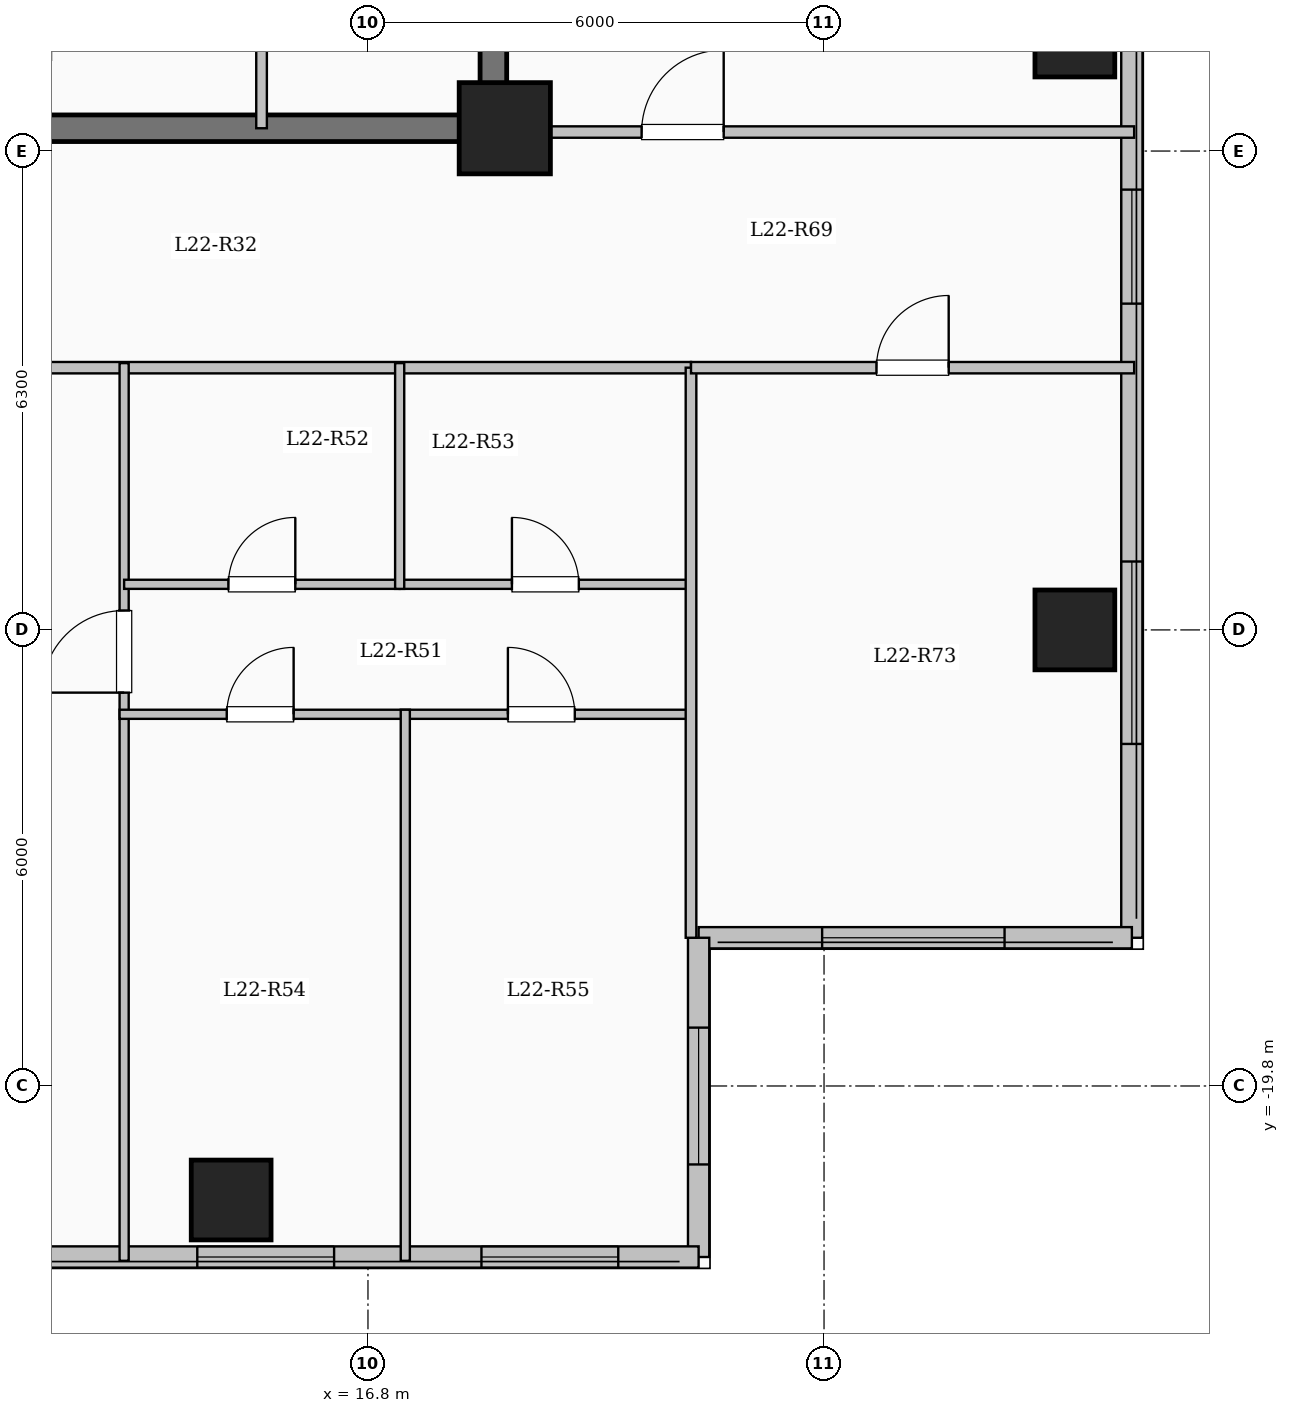
"""IFC4 building model, lengths in metres.
Left out: names, types, materials, properties, quantities, classifications, styles, units other than length and angle.
Written with IfcOpenShell. Run it as: python <this file> out.ifc"""

import sys

from ifc_helpers import new_model, si_unit, direction, frame, frame_2d, origin, origin_2d, place, context, subcontext, project, spatial, rectangle, extrude, element, fill, save


model = new_model("IFC4")
c1 = context("Model", 3, precision=1e-05, world=origin(), true_north=direction((0.0, 1.0)))
c2 = subcontext(c1, "Body", "Model", "MODEL_VIEW")
j1 = project(units=[si_unit("LENGTHUNIT", "METRE"), si_unit("PLANEANGLEUNIT", "RADIAN")], contexts=[c1])
p1 = place(None, origin())
s1 = spatial("IfcSite", under=j1, at=p1, CompositionType="ELEMENT")
p2 = place(p1, origin())
s2 = spatial("IfcBuilding", under=s1, at=p2, CompositionType="ELEMENT")
p3 = place(p2, frame((0.0, 0.0, 85.0)))
s3 = spatial("IfcBuildingStorey", under=s2, at=p3, CompositionType="ELEMENT", Elevation=85.0)
p4 = place(p3, frame((18.6, -7.2, 0.0), z_axis=(0.0, 0.0, 1.0), x_axis=(1.0, 0.0, 0.0)))
e1 = element("IfcColumn", 1, at=p4, inside=s3, PredefinedType="COLUMN", context=c2, shape_type="SweptSolid", body=[
    extrude(rectangle(XDim=1.2, YDim=1.2, at=origin_2d()), origin(), (0.0, 0.0, 1.0), 3.35),
])
for number, where, z_axis, x_axis in (
    (2, (15.0, -21.3, 0.0), (0.0, 0.0, 1.0), (1.0, 0.0, 0.0)),
    (3, (26.1, -13.8, 0.0), (0.0, 0.0, 1.0), (1.0, 0.0, 0.0)),
    (4, (26.1, -6.0, 0.0), (0.0, 0.0, 1.0), (1.0, 0.0, 0.0)),
):
    element("IfcColumn", number, at=place(p3, frame(where, z_axis=z_axis, x_axis=x_axis)), inside=s3, PredefinedType="COLUMN", context=c2, shape_type="SweptSolid", body=[
        extrude(rectangle(XDim=1.05, YDim=1.05, at=origin_2d()), origin(), (0.0, 0.0, 1.0), 3.35),
    ])
p5 = place(p3, frame((26.85, 17.85, 0.0), z_axis=(0.0, 0.0, 1.0), x_axis=(0.0, -1.0, 0.0)))
e5 = element("IfcWall", 5, at=p5, inside=s3, PredefinedType="SOLIDWALL", context=c2, shape_type="SweptSolid", body=[
    extrude(rectangle(XDim=35.7, YDim=0.28, at=frame_2d((17.85, 0.0))), origin(), (0.0, 0.0, 1.0), 3.1),
])
p6 = place(p5, frame((1.675, 0.0, 0.9)))
e6 = element("IfcOpeningElement", 6, at=p6, cuts=e5, PredefinedType="OPENING", context=c2, shape_type="SweptSolid", body=[
    extrude(rectangle(XDim=2.0, YDim=1.7, at=frame_2d((1.0, 0.85))), frame((0.0, 0.15, 0.0), z_axis=(0.0, -1.0, 0.0), x_axis=(1.0, 0.0, 0.0)), (0.0, 0.0, 1.0), 0.3),
])
p7 = place(p5, frame((5.725, 0.0, 0.95)))
e7 = element("IfcOpeningElement", 7, at=p7, cuts=e5, PredefinedType="OPENING", context=c2, shape_type="SweptSolid", body=[
    extrude(rectangle(XDim=1.0, YDim=1.5, at=frame_2d((0.5, 0.75))), frame((0.0, 0.15, 0.0), z_axis=(0.0, -1.0, 0.0), x_axis=(1.0, 0.0, 0.0)), (0.0, 0.0, 1.0), 0.3),
])
p8 = place(p5, frame((15.1, 0.0, 0.9)))
e8 = element("IfcOpeningElement", 8, at=p8, cuts=e5, PredefinedType="OPENING", context=c2, shape_type="SweptSolid", body=[
    extrude(rectangle(XDim=2.0, YDim=1.7, at=frame_2d((1.0, 0.85))), frame((0.0, 0.15, 0.0), z_axis=(0.0, -1.0, 0.0), x_axis=(1.0, 0.0, 0.0)), (0.0, 0.0, 1.0), 0.3),
])
p9 = place(p5, frame((25.857, 0.0, 0.9)))
e9 = element("IfcOpeningElement", 9, at=p9, cuts=e5, PredefinedType="OPENING", context=c2, shape_type="SweptSolid", body=[
    extrude(rectangle(XDim=1.5, YDim=1.65, at=frame_2d((0.75, 0.825))), frame((0.0, 0.15, 0.0), z_axis=(0.0, -1.0, 0.0), x_axis=(1.0, 0.0, 0.0)), (0.0, 0.0, 1.0), 0.3),
])
p10 = place(p5, frame((30.75, 0.0, 0.9)))
e10 = element("IfcOpeningElement", 10, at=p10, cuts=e5, PredefinedType="OPENING", context=c2, shape_type="SweptSolid", body=[
    extrude(rectangle(XDim=2.4, YDim=1.8, at=frame_2d((1.2, 0.9))), frame((0.0, 0.15, 0.0), z_axis=(0.0, -1.0, 0.0), x_axis=(1.0, 0.0, 0.0)), (0.0, 0.0, 1.0), 0.3),
])
p11 = place(p3, frame((26.85, -17.85, 0.0), z_axis=(0.0, 0.0, 1.0), x_axis=(-1.0, 0.0, 0.0)))
e11 = element("IfcWall", 11, at=p11, inside=s3, PredefinedType="SOLIDWALL", context=c2, shape_type="SweptSolid", body=[
    extrude(rectangle(XDim=5.7, YDim=0.28, at=frame_2d((2.85, 0.0))), origin(), (0.0, 0.0, 1.0), 3.1),
])
p12 = place(p11, frame((1.675, 0.0, 0.9)))
e12 = element("IfcOpeningElement", 12, at=p12, cuts=e11, PredefinedType="OPENING", context=c2, shape_type="SweptSolid", body=[
    extrude(rectangle(XDim=2.4, YDim=1.8, at=frame_2d((1.2, 0.9))), frame((0.0, 0.15, 0.0), z_axis=(0.0, -1.0, 0.0), x_axis=(1.0, 0.0, 0.0)), (0.0, 0.0, 1.0), 0.3),
])
p13 = place(p3, frame((21.15, -17.85, 0.0), z_axis=(0.0, 0.0, 1.0), x_axis=(0.0, -1.0, 0.0)))
e13 = element("IfcWall", 13, at=p13, inside=s3, PredefinedType="SOLIDWALL", context=c2, shape_type="SweptSolid", body=[
    extrude(rectangle(XDim=4.2, YDim=0.28, at=frame_2d((2.1, 0.0))), origin(), (0.0, 0.0, 1.0), 3.1),
])
p14 = place(p13, frame((1.182, 0.0, 0.9)))
e14 = element("IfcOpeningElement", 14, at=p14, cuts=e13, PredefinedType="OPENING", context=c2, shape_type="SweptSolid", body=[
    extrude(rectangle(XDim=1.8, YDim=1.65, at=frame_2d((0.9, 0.825))), frame((0.0, 0.15, 0.0), z_axis=(0.0, -1.0, 0.0), x_axis=(1.0, 0.0, 0.0)), (0.0, 0.0, 1.0), 0.3),
])
p15 = place(p3, frame((21.15, -22.05, 0.0), z_axis=(0.0, 0.0, 1.0), x_axis=(-1.0, 0.0, 0.0)))
e15 = element("IfcWall", 15, at=p15, inside=s3, PredefinedType="SOLIDWALL", context=c2, shape_type="SweptSolid", body=[
    extrude(rectangle(XDim=13.8, YDim=0.28, at=frame_2d((6.9, 0.0))), origin(), (0.0, 0.0, 1.0), 3.1),
])
p16 = place(p15, frame((1.057, 0.0, 0.9)))
e16 = element("IfcOpeningElement", 16, at=p16, cuts=e15, PredefinedType="OPENING", context=c2, shape_type="SweptSolid", body=[
    extrude(rectangle(XDim=1.8, YDim=1.65, at=frame_2d((0.9, 0.825))), frame((0.0, 0.15, 0.0), z_axis=(0.0, -1.0, 0.0), x_axis=(1.0, 0.0, 0.0)), (0.0, 0.0, 1.0), 0.3),
])
p17 = place(p15, frame((4.796, 0.0, 0.9)))
e17 = element("IfcOpeningElement", 17, at=p17, cuts=e15, PredefinedType="OPENING", context=c2, shape_type="SweptSolid", body=[
    extrude(rectangle(XDim=1.8, YDim=1.65, at=frame_2d((0.9, 0.825))), frame((0.0, 0.15, 0.0), z_axis=(0.0, -1.0, 0.0), x_axis=(1.0, 0.0, 0.0)), (0.0, 0.0, 1.0), 0.3),
])
p18 = place(p15, frame((8.862, 0.0, 0.9)))
e18 = element("IfcOpeningElement", 18, at=p18, cuts=e15, PredefinedType="OPENING", context=c2, shape_type="SweptSolid", body=[
    extrude(rectangle(XDim=2.4, YDim=1.8, at=frame_2d((1.2, 0.9))), frame((0.0, 0.15, 0.0), z_axis=(0.0, -1.0, 0.0), x_axis=(1.0, 0.0, 0.0)), (0.0, 0.0, 1.0), 0.3),
])
p19 = place(p15, frame((12.803, 0.0, 0.95)))
e19 = element("IfcOpeningElement", 19, at=p19, cuts=e15, PredefinedType="OPENING", context=c2, shape_type="SweptSolid", body=[
    extrude(rectangle(XDim=0.85, YDim=1.5, at=frame_2d((0.425, 0.75))), frame((0.0, 0.15, 0.0), z_axis=(0.0, -1.0, 0.0), x_axis=(1.0, 0.0, 0.0)), (0.0, 0.0, 1.0), 0.3),
])
p20 = place(p3, frame((18.45, -7.375, 0.0), z_axis=(0.0, 0.0, 1.0), x_axis=(0.0, 1.0, 0.0)))
e20 = element("IfcWall", 20, at=p20, inside=s3, PredefinedType="SHEAR", context=c2, shape_type="SweptSolid", body=[
    extrude(rectangle(XDim=14.05, YDim=0.35, at=frame_2d((7.025, 0.0))), origin(), (0.0, 0.0, 1.0), 3.35),
])
p21 = place(p3, frame((10.075, -7.2, 0.0), z_axis=(0.0, 0.0, 1.0), x_axis=(1.0, 0.0, 0.0)))
e21 = element("IfcWall", 21, at=p21, inside=s3, PredefinedType="SHEAR", context=c2, shape_type="SweptSolid", body=[
    extrude(rectangle(XDim=8.55, YDim=0.35, at=frame_2d((4.275, 0.0))), origin(), (0.0, 0.0, 1.0), 3.35),
])
p22 = place(p3, frame((15.4, -7.2, 0.0), z_axis=(0.0, 0.0, 1.0), x_axis=(0.0, 1.0, 0.0)))
e22 = element("IfcWall", 22, at=p22, inside=s3, PredefinedType="PARTITIONING", context=c2, shape_type="SweptSolid", body=[
    extrude(rectangle(XDim=10.45, YDim=0.14, at=frame_2d((5.225, 0.0))), origin(), (0.0, 0.0, 1.0), 3.1),
])
p23 = place(p22, frame((9.25, 0.0, 0.0)))
e23 = element("IfcOpeningElement", 23, at=p23, cuts=e22, PredefinedType="OPENING", context=c2, shape_type="SweptSolid", body=[
    extrude(rectangle(XDim=0.9, YDim=2.08, at=frame_2d((0.45, 1.04))), frame((0.0, 0.08, 0.0), z_axis=(0.0, -1.0, 0.0), x_axis=(1.0, 0.0, 0.0)), (0.0, 0.0, 1.0), 0.16),
])
p24 = place(p3, frame((8.55, -10.35, 0.0), z_axis=(0.0, 0.0, 1.0), x_axis=(1.0, 0.0, 0.0)))
e24 = element("IfcWall", 24, at=p24, inside=s3, PredefinedType="PARTITIONING", context=c2, shape_type="SweptSolid", body=[
    extrude(rectangle(XDim=12.5, YDim=0.15, at=frame_2d((6.25, 0.0))), origin(), (0.0, 0.0, 1.0), 3.1),
])
p25 = place(p24, frame((0.75, 0.0, 0.0)))
e25 = element("IfcOpeningElement", 25, at=p25, cuts=e24, PredefinedType="OPENING", context=c2, shape_type="SweptSolid", body=[
    extrude(rectangle(XDim=0.96, YDim=2.15, at=frame_2d((0.48, 1.075))), frame((0.0, 0.085, 0.0), z_axis=(0.0, -1.0, 0.0), x_axis=(1.0, 0.0, 0.0)), (0.0, 0.0, 1.0), 0.17),
])
p26 = place(p3, frame((13.592, -22.1, 0.0), z_axis=(0.0, 0.0, 1.0), x_axis=(0.0, 1.0, 0.0)))
e26 = element("IfcWall", 26, at=p26, inside=s3, PredefinedType="PARTITIONING", context=c2, shape_type="SweptSolid", body=[
    extrude(rectangle(XDim=11.81, YDim=0.12, at=frame_2d((5.905, 0.0))), origin(), (0.0, 0.0, 1.0), 3.1),
])
p27 = place(p26, frame((7.475, 0.0, 0.0)))
e27 = element("IfcOpeningElement", 27, at=p27, cuts=e26, PredefinedType="OPENING", context=c2, shape_type="SweptSolid", body=[
    extrude(rectangle(XDim=1.08, YDim=2.15, at=frame_2d((0.54, 1.075))), frame((0.0, 0.07, 0.0), z_axis=(0.0, -1.0, 0.0), x_axis=(1.0, 0.0, 0.0)), (0.0, 0.0, 1.0), 0.14),
])
p28 = place(p3, frame((13.592, -13.2, 0.0), z_axis=(0.0, 0.0, 1.0), x_axis=(1.0, 0.0, 0.0)))
e28 = element("IfcWall", 28, at=p28, inside=s3, PredefinedType="PARTITIONING", context=c2, shape_type="SweptSolid", body=[
    extrude(rectangle(XDim=3.625, YDim=0.12, at=frame_2d((1.812, 0.0))), origin(), (0.0, 0.0, 1.0), 3.1),
])
p29 = place(p28, frame((1.372, 0.0, 0.0)))
e29 = element("IfcOpeningElement", 29, at=p29, cuts=e28, PredefinedType="OPENING", context=c2, shape_type="SweptSolid", body=[
    extrude(rectangle(XDim=0.88, YDim=2.1, at=frame_2d((0.44, 1.05))), frame((0.0, 0.07, 0.0), z_axis=(0.0, -1.0, 0.0), x_axis=(1.0, 0.0, 0.0)), (0.0, 0.0, 1.0), 0.14),
])
p30 = place(p3, frame((17.217, -13.2, 0.0), z_axis=(0.0, 0.0, 1.0), x_axis=(1.0, 0.0, 0.0)))
e30 = element("IfcWall", 30, at=p30, inside=s3, PredefinedType="PARTITIONING", context=c2, shape_type="SweptSolid", body=[
    extrude(rectangle(XDim=3.833, YDim=0.12, at=frame_2d((1.917, 0.0))), origin(), (0.0, 0.0, 1.0), 3.1),
])
p31 = place(p30, frame((1.477, 0.0, 0.0)))
e31 = element("IfcOpeningElement", 31, at=p31, cuts=e30, PredefinedType="OPENING", context=c2, shape_type="SweptSolid", body=[
    extrude(rectangle(XDim=0.88, YDim=2.1, at=frame_2d((0.44, 1.05))), frame((0.0, 0.07, 0.0), z_axis=(0.0, -1.0, 0.0), x_axis=(1.0, 0.0, 0.0)), (0.0, 0.0, 1.0), 0.14),
])
p32 = place(p3, frame((13.532, -14.91, 0.0), z_axis=(0.0, 0.0, 1.0), x_axis=(1.0, 0.0, 0.0)))
e32 = element("IfcWall", 32, at=p32, inside=s3, PredefinedType="PARTITIONING", context=c2, shape_type="SweptSolid", body=[
    extrude(rectangle(XDim=7.578, YDim=0.12, at=frame_2d((3.789, 0.0))), origin(), (0.0, 0.0, 1.0), 3.1),
])
p33 = place(p32, frame((1.41, 0.0, 0.0)))
e33 = element("IfcOpeningElement", 33, at=p33, cuts=e32, PredefinedType="OPENING", context=c2, shape_type="SweptSolid", body=[
    extrude(rectangle(XDim=0.88, YDim=2.1, at=frame_2d((0.44, 1.05))), frame((0.0, 0.07, 0.0), z_axis=(0.0, -1.0, 0.0), x_axis=(1.0, 0.0, 0.0)), (0.0, 0.0, 1.0), 0.14),
])
p34 = place(p32, frame((5.109, 0.0, 0.0)))
e34 = element("IfcOpeningElement", 34, at=p34, cuts=e32, PredefinedType="OPENING", context=c2, shape_type="SweptSolid", body=[
    extrude(rectangle(XDim=0.88, YDim=2.1, at=frame_2d((0.44, 1.05))), frame((0.0, 0.07, 0.0), z_axis=(0.0, -1.0, 0.0), x_axis=(1.0, 0.0, 0.0)), (0.0, 0.0, 1.0), 0.14),
])
p35 = place(p3, frame((17.217, -13.26, 0.0), z_axis=(0.0, 0.0, 1.0), x_axis=(0.0, 1.0, 0.0)))
e35 = element("IfcWall", 35, at=p35, inside=s3, PredefinedType="PARTITIONING", context=c2, shape_type="SweptSolid", body=[
    extrude(rectangle(XDim=2.97, YDim=0.12, at=frame_2d((1.485, 0.0))), origin(), (0.0, 0.0, 1.0), 3.1),
])
p36 = place(p3, frame((17.291, -22.1, 0.0), z_axis=(0.0, 0.0, 1.0), x_axis=(0.0, 1.0, 0.0)))
e36 = element("IfcWall", 36, at=p36, inside=s3, PredefinedType="PARTITIONING", context=c2, shape_type="SweptSolid", body=[
    extrude(rectangle(XDim=7.25, YDim=0.12, at=frame_2d((3.625, 0.0))), origin(), (0.0, 0.0, 1.0), 3.1),
])
p37 = place(p3, frame((18.45, -7.25, 0.0), z_axis=(0.0, 0.0, 1.0), x_axis=(1.0, 0.0, 0.0)))
e37 = element("IfcWall", 37, at=p37, inside=s3, PredefinedType="PARTITIONING", context=c2, shape_type="SweptSolid", body=[
    extrude(rectangle(XDim=8.43, YDim=0.15, at=frame_2d((4.215, 0.0))), origin(), (0.0, 0.0, 1.0), 3.1),
])
p38 = place(p37, frame((1.95, 0.0, 0.0)))
e38 = element("IfcOpeningElement", 38, at=p38, cuts=e37, PredefinedType="OPENING", context=c2, shape_type="SweptSolid", body=[
    extrude(rectangle(XDim=1.08, YDim=2.15, at=frame_2d((0.54, 1.075))), frame((0.0, 0.085, 0.0), z_axis=(0.0, -1.0, 0.0), x_axis=(1.0, 0.0, 0.0)), (0.0, 0.0, 1.0), 0.17),
])
p39 = place(p3, frame((21.05, -17.85, 0.0), z_axis=(0.0, 0.0, 1.0), x_axis=(0.0, 1.0, 0.0)))
e39 = element("IfcWall", 39, at=p39, inside=s3, PredefinedType="PARTITIONING", context=c2, shape_type="SweptSolid", body=[
    extrude(rectangle(XDim=7.5, YDim=0.14, at=frame_2d((3.75, 0.0))), origin(), (0.0, 0.0, 1.0), 3.1),
])
p40 = place(p3, frame((21.05, -10.35, 0.0), z_axis=(0.0, 0.0, 1.0), x_axis=(1.0, 0.0, 0.0)))
e40 = element("IfcWall", 40, at=p40, inside=s3, PredefinedType="PARTITIONING", context=c2, shape_type="SweptSolid", body=[
    extrude(rectangle(XDim=5.83, YDim=0.15, at=frame_2d((2.915, 0.0))), origin(), (0.0, 0.0, 1.0), 3.1),
])
p41 = place(p40, frame((2.44, 0.0, 0.0)))
e41 = element("IfcOpeningElement", 41, at=p41, cuts=e40, PredefinedType="OPENING", context=c2, shape_type="SweptSolid", body=[
    extrude(rectangle(XDim=0.95, YDim=2.15, at=frame_2d((0.475, 1.075))), frame((0.0, 0.085, 0.0), z_axis=(0.0, -1.0, 0.0), x_axis=(1.0, 0.0, 0.0)), (0.0, 0.0, 1.0), 0.17),
])
p42 = place(p9, origin())
e42 = element("IfcWindow", 42, at=p42, inside=s3, PartitioningType="SINGLE_PANEL", PredefinedType="WINDOW", context=c2, shape_type="SweptSolid", body=[
    extrude(rectangle(XDim=1.5, YDim=1.65, at=frame_2d((0.75, 0.825))), frame((0.0, 0.03, 0.0), z_axis=(0.0, -1.0, 0.0), x_axis=(1.0, 0.0, 0.0)), (0.0, 0.0, 1.0), 0.06),
])
fill(e9, e42)
p43 = place(p10, origin())
e43 = element("IfcWindow", 43, at=p43, inside=s3, PartitioningType="SINGLE_PANEL", PredefinedType="WINDOW", context=c2, shape_type="SweptSolid", body=[
    extrude(rectangle(XDim=2.4, YDim=1.8, at=frame_2d((1.2, 0.9))), frame((0.0, 0.03, 0.0), z_axis=(0.0, -1.0, 0.0), x_axis=(1.0, 0.0, 0.0)), (0.0, 0.0, 1.0), 0.06),
])
fill(e10, e43)
p44 = place(p12, origin())
e44 = element("IfcWindow", 44, at=p44, inside=s3, PartitioningType="SINGLE_PANEL", PredefinedType="WINDOW", context=c2, shape_type="SweptSolid", body=[
    extrude(rectangle(XDim=2.4, YDim=1.8, at=frame_2d((1.2, 0.9))), frame((0.0, 0.03, 0.0), z_axis=(0.0, -1.0, 0.0), x_axis=(1.0, 0.0, 0.0)), (0.0, 0.0, 1.0), 0.06),
])
fill(e12, e44)
p45 = place(p14, origin())
e45 = element("IfcWindow", 45, at=p45, inside=s3, PartitioningType="SINGLE_PANEL", PredefinedType="WINDOW", context=c2, shape_type="SweptSolid", body=[
    extrude(rectangle(XDim=1.8, YDim=1.65, at=frame_2d((0.9, 0.825))), frame((0.0, 0.03, 0.0), z_axis=(0.0, -1.0, 0.0), x_axis=(1.0, 0.0, 0.0)), (0.0, 0.0, 1.0), 0.06),
])
fill(e14, e45)
p46 = place(p16, origin())
e46 = element("IfcWindow", 46, at=p46, inside=s3, PartitioningType="SINGLE_PANEL", PredefinedType="WINDOW", context=c2, shape_type="SweptSolid", body=[
    extrude(rectangle(XDim=1.8, YDim=1.65, at=frame_2d((0.9, 0.825))), frame((0.0, 0.03, 0.0), z_axis=(0.0, -1.0, 0.0), x_axis=(1.0, 0.0, 0.0)), (0.0, 0.0, 1.0), 0.06),
])
fill(e16, e46)
p47 = place(p17, origin())
e47 = element("IfcWindow", 47, at=p47, inside=s3, PartitioningType="SINGLE_PANEL", PredefinedType="WINDOW", context=c2, shape_type="SweptSolid", body=[
    extrude(rectangle(XDim=1.8, YDim=1.65, at=frame_2d((0.9, 0.825))), frame((0.0, 0.03, 0.0), z_axis=(0.0, -1.0, 0.0), x_axis=(1.0, 0.0, 0.0)), (0.0, 0.0, 1.0), 0.06),
])
fill(e17, e47)
p48 = place(p27, origin())
e48 = element("IfcDoor", 48, at=p48, inside=s3, OperationType="SINGLE_SWING_LEFT", PredefinedType="DOOR", context=c2, shape_type="SweptSolid", body=[
    extrude(rectangle(XDim=1.08, YDim=2.15, at=frame_2d((0.54, 1.075))), frame((0.0, 0.025, 0.0), z_axis=(0.0, -1.0, 0.0), x_axis=(1.0, 0.0, 0.0)), (0.0, 0.0, 1.0), 0.05),
])
fill(e27, e48)
p49 = place(p29, origin())
e49 = element("IfcDoor", 49, at=p49, inside=s3, OperationType="SINGLE_SWING_RIGHT", PredefinedType="DOOR", context=c2, shape_type="SweptSolid", body=[
    extrude(rectangle(XDim=0.88, YDim=2.1, at=frame_2d((0.44, 1.05))), frame((0.0, 0.025, 0.0), z_axis=(0.0, -1.0, 0.0), x_axis=(1.0, 0.0, 0.0)), (0.0, 0.0, 1.0), 0.05),
])
fill(e29, e49)
p50 = place(p31, origin())
e50 = element("IfcDoor", 50, at=p50, inside=s3, OperationType="SINGLE_SWING_LEFT", PredefinedType="DOOR", context=c2, shape_type="SweptSolid", body=[
    extrude(rectangle(XDim=0.88, YDim=2.1, at=frame_2d((0.44, 1.05))), frame((0.0, 0.025, 0.0), z_axis=(0.0, -1.0, 0.0), x_axis=(1.0, 0.0, 0.0)), (0.0, 0.0, 1.0), 0.05),
])
fill(e31, e50)
p51 = place(p33, origin())
e51 = element("IfcDoor", 51, at=p51, inside=s3, OperationType="SINGLE_SWING_RIGHT", PredefinedType="DOOR", context=c2, shape_type="SweptSolid", body=[
    extrude(rectangle(XDim=0.88, YDim=2.1, at=frame_2d((0.44, 1.05))), frame((0.0, 0.025, 0.0), z_axis=(0.0, -1.0, 0.0), x_axis=(1.0, 0.0, 0.0)), (0.0, 0.0, 1.0), 0.05),
])
fill(e33, e51)
p52 = place(p34, origin())
e52 = element("IfcDoor", 52, at=p52, inside=s3, OperationType="SINGLE_SWING_LEFT", PredefinedType="DOOR", context=c2, shape_type="SweptSolid", body=[
    extrude(rectangle(XDim=0.88, YDim=2.1, at=frame_2d((0.44, 1.05))), frame((0.0, 0.025, 0.0), z_axis=(0.0, -1.0, 0.0), x_axis=(1.0, 0.0, 0.0)), (0.0, 0.0, 1.0), 0.05),
])
fill(e34, e52)
p53 = place(p41, origin())
e53 = element("IfcDoor", 53, at=p53, inside=s3, OperationType="SINGLE_SWING_RIGHT", PredefinedType="DOOR", context=c2, shape_type="SweptSolid", body=[
    extrude(rectangle(XDim=0.95, YDim=2.15, at=frame_2d((0.475, 1.075))), frame((0.0, 0.025, 0.0), z_axis=(0.0, -1.0, 0.0), x_axis=(1.0, 0.0, 0.0)), (0.0, 0.0, 1.0), 0.05),
])
fill(e41, e53)
p54 = place(p38, origin())
e54 = element("IfcDoor", 54, at=p54, inside=s3, OperationType="SINGLE_SWING_RIGHT", PredefinedType="DOOR", context=c2, shape_type="SweptSolid", body=[
    extrude(rectangle(XDim=1.08, YDim=2.15, at=frame_2d((0.54, 1.075))), frame((0.0, 0.025, 0.0), z_axis=(0.0, -1.0, 0.0), x_axis=(1.0, 0.0, 0.0)), (0.0, 0.0, 1.0), 0.05),
])
fill(e38, e54)
save(model, sys.argv[1])
